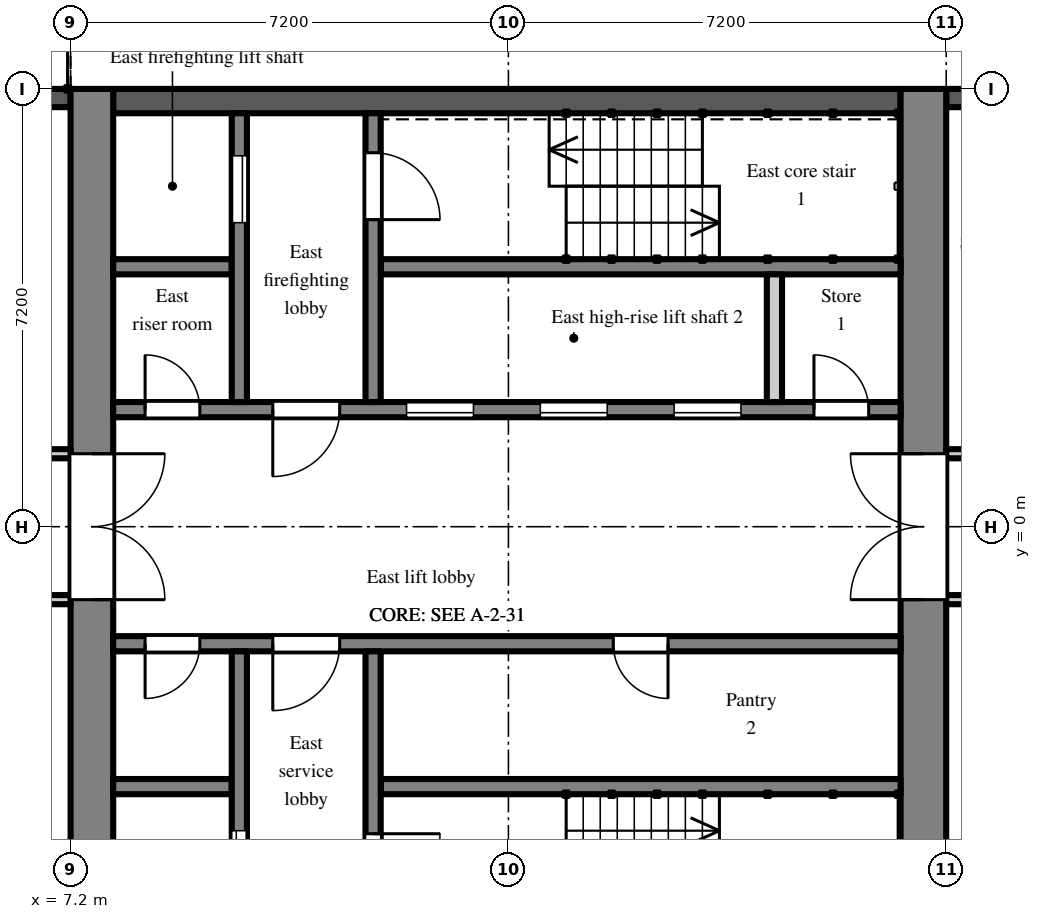
"""IFC4 building model, lengths in metres.
Left out: names, types, materials, properties, quantities, classifications, styles, units other than length and angle.
Written with IfcOpenShell. Run it as: python <this file> out.ifc"""

import sys

from ifc_helpers import new_model, si_unit, direction, frame, frame_2d, origin, place, context, subcontext, project, spatial, rectangle, extrude, element, fill, save


model = new_model("IFC4")
c1 = context("Model", 3, precision=1e-05, world=origin(), true_north=direction((0.0, 1.0)))
c2 = subcontext(c1, "Body", "Model", "MODEL_VIEW")
j1 = project(units=[si_unit("LENGTHUNIT", "METRE"), si_unit("PLANEANGLEUNIT", "RADIAN")], contexts=[c1])
p1 = place(None, origin())
s1 = spatial("IfcSite", under=j1, at=p1, CompositionType="ELEMENT")
p2 = place(p1, origin())
s2 = spatial("IfcBuilding", under=s1, at=p2, CompositionType="ELEMENT")
p3 = place(p2, frame((0.0, 0.0, 188.7)))
s3 = spatial("IfcBuildingStorey", under=s2, at=p3, CompositionType="ELEMENT", Elevation=188.7)
p4 = place(p3, frame((24.3, 7.05, 0.0), z_axis=(0.0, 0.0, 1.0), x_axis=(-1.0, 0.0, 0.0)))
e1 = element("IfcWall", 1, at=p4, inside=s3, PredefinedType="SOLIDWALL", context=c2, shape_type="SweptSolid", body=[
    extrude(rectangle(XDim=2.7, YDim=0.3, at=frame_2d((1.35, 0.0))), origin(), (0.0, 0.0, 1.0), 2.2),
])
p5 = place(p4, frame((0.75, 0.0, 0.2)))
e2 = element("IfcOpeningElement", 2, at=p5, cuts=e1, PredefinedType="OPENING", context=c2, shape_type="SweptSolid", body=[
    extrude(rectangle(XDim=1.2, YDim=1.85, at=frame_2d((0.6, 0.925))), frame((0.0, 0.16, 0.0), z_axis=(0.0, -1.0, 0.0), x_axis=(1.0, 0.0, 0.0)), (0.0, 0.0, 1.0), 0.32),
])
p6 = place(p3, frame((7.2, 7.05, 0.0), z_axis=(0.0, 0.0, 1.0), x_axis=(-1.0, 0.0, 0.0)))
e3 = element("IfcWall", 3, at=p6, inside=s3, PredefinedType="SOLIDWALL", context=c2, shape_type="SweptSolid", body=[
    extrude(rectangle(XDim=3.0, YDim=0.3, at=frame_2d((1.5, 0.0))), origin(), (0.0, 0.0, 1.0), 2.2),
])
p7 = place(p3, frame((7.55, -7.2, 0.0), z_axis=(0.0, 0.0, 1.0), x_axis=(0.0, 1.0, 0.0)))
e4 = element("IfcWall", 4, at=p7, inside=s3, PredefinedType="SHEAR", context=c2, shape_type="SweptSolid", body=[
    extrude(rectangle(XDim=14.4, YDim=0.7, at=frame_2d((7.2, 0.0))), origin(), (0.0, 0.0, 1.0), 2.6),
])
p8 = place(p7, frame((6.0, 0.0, 0.0)))
e5 = element("IfcOpeningElement", 5, at=p8, cuts=e4, PredefinedType="OPENING", context=c2, shape_type="SweptSolid", body=[
    extrude(rectangle(XDim=2.4, YDim=2.2, at=frame_2d((1.2, 1.1))), frame((0.0, 0.36, 0.0), z_axis=(0.0, -1.0, 0.0), x_axis=(1.0, 0.0, 0.0)), (0.0, 0.0, 1.0), 0.72),
])
p9 = place(p3, frame((21.225, -7.2, 0.0), z_axis=(0.0, 0.0, 1.0), x_axis=(0.0, 1.0, 0.0)))
e6 = element("IfcWall", 6, at=p9, inside=s3, PredefinedType="SHEAR", context=c2, shape_type="SweptSolid", body=[
    extrude(rectangle(XDim=14.4, YDim=0.75, at=frame_2d((7.2, 0.0))), origin(), (0.0, 0.0, 1.0), 2.6),
])
p10 = place(p9, frame((6.0, 0.0, 0.0)))
e7 = element("IfcOpeningElement", 7, at=p10, cuts=e6, PredefinedType="OPENING", context=c2, shape_type="SweptSolid", body=[
    extrude(rectangle(XDim=2.4, YDim=2.2, at=frame_2d((1.2, 1.1))), frame((0.0, 0.385, 0.0), z_axis=(0.0, -1.0, 0.0), x_axis=(1.0, 0.0, 0.0)), (0.0, 0.0, 1.0), 0.77),
])
p11 = place(p3, frame((7.9, 7.0, 0.0), z_axis=(0.0, 0.0, 1.0), x_axis=(1.0, 0.0, 0.0)))
e8 = element("IfcWall", 8, at=p11, inside=s3, PredefinedType="SHEAR", context=c2, shape_type="SweptSolid", body=[
    extrude(rectangle(XDim=12.95, YDim=0.4, at=frame_2d((6.475, 0.0))), origin(), (0.0, 0.0, 1.0), 2.6),
])
p12 = place(p3, frame((7.9, 1.925, 0.0), z_axis=(0.0, 0.0, 1.0), x_axis=(1.0, 0.0, 0.0)))
e9 = element("IfcWall", 9, at=p12, inside=s3, PredefinedType="SHEAR", context=c2, shape_type="SweptSolid", body=[
    extrude(rectangle(XDim=12.95, YDim=0.25, at=frame_2d((6.475, 0.0))), origin(), (0.0, 0.0, 1.0), 2.6),
])
p13 = place(p12, frame((4.825, 0.0, 0.0)))
e10 = element("IfcOpeningElement", 10, at=p13, cuts=e9, PredefinedType="OPENING", context=c2, shape_type="SweptSolid", body=[
    extrude(rectangle(XDim=1.1, YDim=2.1, at=frame_2d((0.55, 1.05))), frame((0.0, 0.135, 0.0), z_axis=(0.0, -1.0, 0.0), x_axis=(1.0, 0.0, 0.0)), (0.0, 0.0, 1.0), 0.27),
])
p14 = place(p12, frame((7.025, 0.0, 0.0)))
e11 = element("IfcOpeningElement", 11, at=p14, cuts=e9, PredefinedType="OPENING", context=c2, shape_type="SweptSolid", body=[
    extrude(rectangle(XDim=1.1, YDim=2.1, at=frame_2d((0.55, 1.05))), frame((0.0, 0.135, 0.0), z_axis=(0.0, -1.0, 0.0), x_axis=(1.0, 0.0, 0.0)), (0.0, 0.0, 1.0), 0.27),
])
p15 = place(p12, frame((9.225, 0.0, 0.0)))
e12 = element("IfcOpeningElement", 12, at=p15, cuts=e9, PredefinedType="OPENING", context=c2, shape_type="SweptSolid", body=[
    extrude(rectangle(XDim=1.1, YDim=2.1, at=frame_2d((0.55, 1.05))), frame((0.0, 0.135, 0.0), z_axis=(0.0, -1.0, 0.0), x_axis=(1.0, 0.0, 0.0)), (0.0, 0.0, 1.0), 0.27),
])
p16 = place(p12, frame((0.525, 0.0, 0.0)))
e13 = element("IfcOpeningElement", 13, at=p16, cuts=e9, PredefinedType="OPENING", context=c2, shape_type="SweptSolid", body=[
    extrude(rectangle(XDim=0.9, YDim=2.1, at=frame_2d((0.45, 1.05))), frame((0.0, 0.135, 0.0), z_axis=(0.0, -1.0, 0.0), x_axis=(1.0, 0.0, 0.0)), (0.0, 0.0, 1.0), 0.27),
])
p17 = place(p12, frame((2.625, 0.0, 0.0)))
e14 = element("IfcOpeningElement", 14, at=p17, cuts=e9, PredefinedType="OPENING", context=c2, shape_type="SweptSolid", body=[
    extrude(rectangle(XDim=1.1, YDim=2.1, at=frame_2d((0.55, 1.05))), frame((0.0, 0.135, 0.0), z_axis=(0.0, -1.0, 0.0), x_axis=(1.0, 0.0, 0.0)), (0.0, 0.0, 1.0), 0.27),
])
p18 = place(p12, frame((11.525, 0.0, 0.0)))
e15 = element("IfcOpeningElement", 15, at=p18, cuts=e9, PredefinedType="OPENING", context=c2, shape_type="SweptSolid", body=[
    extrude(rectangle(XDim=0.9, YDim=2.1, at=frame_2d((0.45, 1.05))), frame((0.0, 0.135, 0.0), z_axis=(0.0, -1.0, 0.0), x_axis=(1.0, 0.0, 0.0)), (0.0, 0.0, 1.0), 0.27),
])
p19 = place(p3, frame((7.9, 4.275, 0.0), z_axis=(0.0, 0.0, 1.0), x_axis=(1.0, 0.0, 0.0)))
e16 = element("IfcWall", 16, at=p19, inside=s3, PredefinedType="SHEAR", context=c2, shape_type="SweptSolid", body=[
    extrude(rectangle(XDim=1.95, YDim=0.25, at=frame_2d((0.975, 0.0))), origin(), (0.0, 0.0, 1.0), 2.6),
])
p20 = place(p3, frame((12.3, 4.275, 0.0), z_axis=(0.0, 0.0, 1.0), x_axis=(1.0, 0.0, 0.0)))
e17 = element("IfcWall", 17, at=p20, inside=s3, PredefinedType="SHEAR", context=c2, shape_type="SweptSolid", body=[
    extrude(rectangle(XDim=8.55, YDim=0.25, at=frame_2d((4.275, 0.0))), origin(), (0.0, 0.0, 1.0), 2.6),
])
p21 = place(p3, frame((9.975, 2.05, 0.0), z_axis=(0.0, 0.0, 1.0), x_axis=(0.0, 1.0, 0.0)))
e18 = element("IfcWall", 18, at=p21, inside=s3, PredefinedType="SHEAR", context=c2, shape_type="SweptSolid", body=[
    extrude(rectangle(XDim=4.75, YDim=0.25, at=frame_2d((2.375, 0.0))), origin(), (0.0, 0.0, 1.0), 2.6),
])
p22 = place(p21, frame((2.95, 0.0, 0.0)))
e19 = element("IfcOpeningElement", 19, at=p22, cuts=e18, PredefinedType="OPENING", context=c2, shape_type="SweptSolid", body=[
    extrude(rectangle(XDim=1.1, YDim=2.1, at=frame_2d((0.55, 1.05))), frame((0.0, 0.135, 0.0), z_axis=(0.0, -1.0, 0.0), x_axis=(1.0, 0.0, 0.0)), (0.0, 0.0, 1.0), 0.27),
])
p23 = place(p3, frame((12.175, 2.05, 0.0), z_axis=(0.0, 0.0, 1.0), x_axis=(0.0, 1.0, 0.0)))
e20 = element("IfcWall", 20, at=p23, inside=s3, PredefinedType="SHEAR", context=c2, shape_type="SweptSolid", body=[
    extrude(rectangle(XDim=4.75, YDim=0.25, at=frame_2d((2.375, 0.0))), origin(), (0.0, 0.0, 1.0), 2.6),
])
p24 = place(p23, frame((3.0, 0.0, 0.0)))
e21 = element("IfcOpeningElement", 21, at=p24, cuts=e20, PredefinedType="OPENING", context=c2, shape_type="SweptSolid", body=[
    extrude(rectangle(XDim=1.1, YDim=2.1, at=frame_2d((0.55, 1.05))), frame((0.0, 0.135, 0.0), z_axis=(0.0, -1.0, 0.0), x_axis=(1.0, 0.0, 0.0)), (0.0, 0.0, 1.0), 0.27),
])
p25 = place(p3, frame((18.775, 2.05, 0.0), z_axis=(0.0, 0.0, 1.0), x_axis=(0.0, 1.0, 0.0)))
e22 = element("IfcWall", 22, at=p25, inside=s3, PredefinedType="PARTITIONING", context=c2, shape_type="SweptSolid", body=[
    extrude(rectangle(XDim=2.1, YDim=0.25, at=frame_2d((1.05, 0.0))), origin(), (0.0, 0.0, 1.0), 2.6),
])
p26 = place(p3, frame((7.9, -1.925, 0.0), z_axis=(0.0, 0.0, 1.0), x_axis=(1.0, 0.0, 0.0)))
e23 = element("IfcWall", 23, at=p26, inside=s3, PredefinedType="SHEAR", context=c2, shape_type="SweptSolid", body=[
    extrude(rectangle(XDim=12.95, YDim=0.25, at=frame_2d((6.475, 0.0))), origin(), (0.0, 0.0, 1.0), 2.6),
])
p27 = place(p26, frame((0.525, 0.0, 0.0)))
e24 = element("IfcOpeningElement", 24, at=p27, cuts=e23, PredefinedType="OPENING", context=c2, shape_type="SweptSolid", body=[
    extrude(rectangle(XDim=0.9, YDim=2.1, at=frame_2d((0.45, 1.05))), frame((0.0, 0.135, 0.0), z_axis=(0.0, -1.0, 0.0), x_axis=(1.0, 0.0, 0.0)), (0.0, 0.0, 1.0), 0.27),
])
p28 = place(p26, frame((2.625, 0.0, 0.0)))
e25 = element("IfcOpeningElement", 25, at=p28, cuts=e23, PredefinedType="OPENING", context=c2, shape_type="SweptSolid", body=[
    extrude(rectangle(XDim=1.1, YDim=2.1, at=frame_2d((0.55, 1.05))), frame((0.0, 0.135, 0.0), z_axis=(0.0, -1.0, 0.0), x_axis=(1.0, 0.0, 0.0)), (0.0, 0.0, 1.0), 0.27),
])
p29 = place(p26, frame((8.225, 0.0, 0.0)))
e26 = element("IfcOpeningElement", 26, at=p29, cuts=e23, PredefinedType="OPENING", context=c2, shape_type="SweptSolid", body=[
    extrude(rectangle(XDim=0.9, YDim=2.1, at=frame_2d((0.45, 1.05))), frame((0.0, 0.135, 0.0), z_axis=(0.0, -1.0, 0.0), x_axis=(1.0, 0.0, 0.0)), (0.0, 0.0, 1.0), 0.27),
])
p30 = place(p3, frame((7.9, -4.275, 0.0), z_axis=(0.0, 0.0, 1.0), x_axis=(1.0, 0.0, 0.0)))
e27 = element("IfcWall", 27, at=p30, inside=s3, PredefinedType="SHEAR", context=c2, shape_type="SweptSolid", body=[
    extrude(rectangle(XDim=1.95, YDim=0.25, at=frame_2d((0.975, 0.0))), origin(), (0.0, 0.0, 1.0), 2.6),
])
p31 = place(p3, frame((12.3, -4.275, 0.0), z_axis=(0.0, 0.0, 1.0), x_axis=(1.0, 0.0, 0.0)))
e28 = element("IfcWall", 28, at=p31, inside=s3, PredefinedType="SHEAR", context=c2, shape_type="SweptSolid", body=[
    extrude(rectangle(XDim=8.55, YDim=0.25, at=frame_2d((4.275, 0.0))), origin(), (0.0, 0.0, 1.0), 2.6),
])
p32 = place(p3, frame((9.975, -2.05, 0.0), z_axis=(0.0, 0.0, 1.0), x_axis=(0.0, -1.0, 0.0)))
e29 = element("IfcWall", 29, at=p32, inside=s3, PredefinedType="SHEAR", context=c2, shape_type="SweptSolid", body=[
    extrude(rectangle(XDim=4.75, YDim=0.25, at=frame_2d((2.375, 0.0))), origin(), (0.0, 0.0, 1.0), 2.6),
])
p33 = place(p32, frame((2.95, 0.0, 0.0)))
e30 = element("IfcOpeningElement", 30, at=p33, cuts=e29, PredefinedType="OPENING", context=c2, shape_type="SweptSolid", body=[
    extrude(rectangle(XDim=1.1, YDim=2.1, at=frame_2d((0.55, 1.05))), frame((0.0, 0.135, 0.0), z_axis=(0.0, -1.0, 0.0), x_axis=(1.0, 0.0, 0.0)), (0.0, 0.0, 1.0), 0.27),
])
p34 = place(p3, frame((12.175, -2.05, 0.0), z_axis=(0.0, 0.0, 1.0), x_axis=(0.0, -1.0, 0.0)))
e31 = element("IfcWall", 31, at=p34, inside=s3, PredefinedType="SHEAR", context=c2, shape_type="SweptSolid", body=[
    extrude(rectangle(XDim=4.75, YDim=0.25, at=frame_2d((2.375, 0.0))), origin(), (0.0, 0.0, 1.0), 2.6),
])
p35 = place(p34, frame((3.0, 0.0, 0.0)))
e32 = element("IfcOpeningElement", 32, at=p35, cuts=e31, PredefinedType="OPENING", context=c2, shape_type="SweptSolid", body=[
    extrude(rectangle(XDim=1.1, YDim=2.1, at=frame_2d((0.55, 1.05))), frame((0.0, 0.135, 0.0), z_axis=(0.0, -1.0, 0.0), x_axis=(1.0, 0.0, 0.0)), (0.0, 0.0, 1.0), 0.27),
])
p36 = place(p3, frame((1.275, -1.2, 0.0), z_axis=(0.0, 0.0, 1.0), x_axis=(1.0, 0.0, 0.0)))
e33 = element("IfcWall", 33, at=p36, inside=s3, PredefinedType="PARTITIONING", context=c2, shape_type="SweptSolid", body=[
    extrude(rectangle(XDim=5.925, YDim=0.15, at=frame_2d((2.962, 0.0))), origin(), (0.0, 0.0, 1.0), 2.6),
])
p37 = place(p36, frame((2.475, 0.0, 0.0)))
e34 = element("IfcOpeningElement", 34, at=p37, cuts=e33, PredefinedType="OPENING", context=c2, shape_type="SweptSolid", body=[
    extrude(rectangle(XDim=0.9, YDim=2.1, at=frame_2d((0.45, 1.05))), frame((0.0, 0.085, 0.0), z_axis=(0.0, -1.0, 0.0), x_axis=(1.0, 0.0, 0.0)), (0.0, 0.0, 1.0), 0.17),
])
p38 = place(p36, frame((4.475, 0.0, 0.0)))
e35 = element("IfcOpeningElement", 35, at=p38, cuts=e33, PredefinedType="OPENING", context=c2, shape_type="SweptSolid", body=[
    extrude(rectangle(XDim=0.9, YDim=2.1, at=frame_2d((0.45, 1.05))), frame((0.0, 0.085, 0.0), z_axis=(0.0, -1.0, 0.0), x_axis=(1.0, 0.0, 0.0)), (0.0, 0.0, 1.0), 0.17),
])
p39 = place(p3, frame((1.275, 1.2, 0.0), z_axis=(0.0, 0.0, 1.0), x_axis=(1.0, 0.0, 0.0)))
e36 = element("IfcWall", 36, at=p39, inside=s3, PredefinedType="PARTITIONING", context=c2, shape_type="SweptSolid", body=[
    extrude(rectangle(XDim=5.925, YDim=0.15, at=frame_2d((2.962, 0.0))), origin(), (0.0, 0.0, 1.0), 2.6),
])
p40 = place(p39, frame((0.675, 0.0, 0.0)))
e37 = element("IfcOpeningElement", 37, at=p40, cuts=e36, PredefinedType="OPENING", context=c2, shape_type="SweptSolid", body=[
    extrude(rectangle(XDim=0.9, YDim=2.1, at=frame_2d((0.45, 1.05))), frame((0.0, 0.085, 0.0), z_axis=(0.0, -1.0, 0.0), x_axis=(1.0, 0.0, 0.0)), (0.0, 0.0, 1.0), 0.17),
])
p41 = place(p39, frame((3.075, 0.0, 0.0)))
e38 = element("IfcOpeningElement", 38, at=p41, cuts=e36, PredefinedType="OPENING", context=c2, shape_type="SweptSolid", body=[
    extrude(rectangle(XDim=0.9, YDim=2.1, at=frame_2d((0.45, 1.05))), frame((0.0, 0.085, 0.0), z_axis=(0.0, -1.0, 0.0), x_axis=(1.0, 0.0, 0.0)), (0.0, 0.0, 1.0), 0.17),
])
p42 = place(p3, frame((21.6, -1.2, 0.0), z_axis=(0.0, 0.0, 1.0), x_axis=(1.0, 0.0, 0.0)))
e39 = element("IfcWall", 39, at=p42, inside=s3, PredefinedType="PARTITIONING", context=c2, shape_type="SweptSolid", body=[
    extrude(rectangle(XDim=5.125, YDim=0.15, at=frame_2d((2.562, 0.0))), origin(), (0.0, 0.0, 1.0), 2.6),
])
p43 = place(p42, frame((1.7, 0.0, 0.0)))
e40 = element("IfcOpeningElement", 40, at=p43, cuts=e39, PredefinedType="OPENING", context=c2, shape_type="SweptSolid", body=[
    extrude(rectangle(XDim=1.8, YDim=2.1, at=frame_2d((0.9, 1.05))), frame((0.0, 0.085, 0.0), z_axis=(0.0, -1.0, 0.0), x_axis=(1.0, 0.0, 0.0)), (0.0, 0.0, 1.0), 0.17),
])
p44 = place(p3, frame((21.6, 1.2, 0.0), z_axis=(0.0, 0.0, 1.0), x_axis=(1.0, 0.0, 0.0)))
e41 = element("IfcWall", 41, at=p44, inside=s3, PredefinedType="PARTITIONING", context=c2, shape_type="SweptSolid", body=[
    extrude(rectangle(XDim=5.125, YDim=0.15, at=frame_2d((2.562, 0.0))), origin(), (0.0, 0.0, 1.0), 2.6),
])
p45 = place(p44, frame((0.6, 0.0, 0.0)))
e42 = element("IfcOpeningElement", 42, at=p45, cuts=e41, PredefinedType="OPENING", context=c2, shape_type="SweptSolid", body=[
    extrude(rectangle(XDim=1.0, YDim=2.1, at=frame_2d((0.5, 1.05))), frame((0.0, 0.085, 0.0), z_axis=(0.0, -1.0, 0.0), x_axis=(1.0, 0.0, 0.0)), (0.0, 0.0, 1.0), 0.17),
])
p46 = place(p13, origin())
e43 = element("IfcDoor", 43, at=p46, inside=s3, OperationType="SLIDING_TO_LEFT", PredefinedType="DOOR", context=c2, shape_type="SweptSolid", body=[
    extrude(rectangle(XDim=1.1, YDim=2.1, at=frame_2d((0.55, 1.05))), frame((0.0, 0.025, 0.0), z_axis=(0.0, -1.0, 0.0), x_axis=(1.0, 0.0, 0.0)), (0.0, 0.0, 1.0), 0.05),
])
fill(e10, e43)
p47 = place(p14, origin())
e44 = element("IfcDoor", 44, at=p47, inside=s3, OperationType="SLIDING_TO_LEFT", PredefinedType="DOOR", context=c2, shape_type="SweptSolid", body=[
    extrude(rectangle(XDim=1.1, YDim=2.1, at=frame_2d((0.55, 1.05))), frame((0.0, 0.025, 0.0), z_axis=(0.0, -1.0, 0.0), x_axis=(1.0, 0.0, 0.0)), (0.0, 0.0, 1.0), 0.05),
])
fill(e11, e44)
p48 = place(p15, origin())
e45 = element("IfcDoor", 45, at=p48, inside=s3, OperationType="SLIDING_TO_LEFT", PredefinedType="DOOR", context=c2, shape_type="SweptSolid", body=[
    extrude(rectangle(XDim=1.1, YDim=2.1, at=frame_2d((0.55, 1.05))), frame((0.0, 0.025, 0.0), z_axis=(0.0, -1.0, 0.0), x_axis=(1.0, 0.0, 0.0)), (0.0, 0.0, 1.0), 0.05),
])
fill(e12, e45)
p49 = place(p22, origin())
e46 = element("IfcDoor", 46, at=p49, inside=s3, OperationType="SLIDING_TO_LEFT", PredefinedType="DOOR", context=c2, shape_type="SweptSolid", body=[
    extrude(rectangle(XDim=1.1, YDim=2.1, at=frame_2d((0.55, 1.05))), frame((0.0, 0.025, 0.0), z_axis=(0.0, -1.0, 0.0), x_axis=(1.0, 0.0, 0.0)), (0.0, 0.0, 1.0), 0.05),
])
fill(e19, e46)
p50 = place(p33, origin())
e47 = element("IfcDoor", 47, at=p50, inside=s3, OperationType="SLIDING_TO_LEFT", PredefinedType="DOOR", context=c2, shape_type="SweptSolid", body=[
    extrude(rectangle(XDim=1.1, YDim=2.1, at=frame_2d((0.55, 1.05))), frame((0.0, 0.025, 0.0), z_axis=(0.0, -1.0, 0.0), x_axis=(1.0, 0.0, 0.0)), (0.0, 0.0, 1.0), 0.05),
])
fill(e30, e47)
p51 = place(p24, frame((1.1, 0.0, 0.0), z_axis=(0.0, 0.0, 1.0), x_axis=(-1.0, 0.0, 0.0)))
e48 = element("IfcDoor", 48, at=p51, inside=s3, OperationType="SINGLE_SWING_RIGHT", PredefinedType="DOOR", context=c2, shape_type="SweptSolid", body=[
    extrude(rectangle(XDim=1.1, YDim=2.1, at=frame_2d((0.55, 1.05))), frame((0.0, 0.025, 0.0), z_axis=(0.0, -1.0, 0.0), x_axis=(1.0, 0.0, 0.0)), (0.0, 0.0, 1.0), 0.05),
])
fill(e21, e48)
p52 = place(p35, origin())
e49 = element("IfcDoor", 49, at=p52, inside=s3, OperationType="SINGLE_SWING_LEFT", PredefinedType="DOOR", context=c2, shape_type="SweptSolid", body=[
    extrude(rectangle(XDim=1.1, YDim=2.1, at=frame_2d((0.55, 1.05))), frame((0.0, 0.025, 0.0), z_axis=(0.0, -1.0, 0.0), x_axis=(1.0, 0.0, 0.0)), (0.0, 0.0, 1.0), 0.05),
])
fill(e32, e49)
p53 = place(p16, origin())
e50 = element("IfcDoor", 50, at=p53, inside=s3, OperationType="SINGLE_SWING_LEFT", PredefinedType="DOOR", context=c2, shape_type="SweptSolid", body=[
    extrude(rectangle(XDim=0.9, YDim=2.1, at=frame_2d((0.45, 1.05))), frame((0.0, 0.025, 0.0), z_axis=(0.0, -1.0, 0.0), x_axis=(1.0, 0.0, 0.0)), (0.0, 0.0, 1.0), 0.05),
])
fill(e13, e50)
p54 = place(p27, frame((0.9, 0.0, 0.0), z_axis=(0.0, 0.0, 1.0), x_axis=(-1.0, 0.0, 0.0)))
e51 = element("IfcDoor", 51, at=p54, inside=s3, OperationType="SINGLE_SWING_RIGHT", PredefinedType="DOOR", context=c2, shape_type="SweptSolid", body=[
    extrude(rectangle(XDim=0.9, YDim=2.1, at=frame_2d((0.45, 1.05))), frame((0.0, 0.025, 0.0), z_axis=(0.0, -1.0, 0.0), x_axis=(1.0, 0.0, 0.0)), (0.0, 0.0, 1.0), 0.05),
])
fill(e24, e51)
p55 = place(p17, frame((1.1, 0.0, 0.0), z_axis=(0.0, 0.0, 1.0), x_axis=(-1.0, 0.0, 0.0)))
e52 = element("IfcDoor", 52, at=p55, inside=s3, OperationType="SINGLE_SWING_RIGHT", PredefinedType="DOOR", context=c2, shape_type="SweptSolid", body=[
    extrude(rectangle(XDim=1.1, YDim=2.1, at=frame_2d((0.55, 1.05))), frame((0.0, 0.025, 0.0), z_axis=(0.0, -1.0, 0.0), x_axis=(1.0, 0.0, 0.0)), (0.0, 0.0, 1.0), 0.05),
])
fill(e14, e52)
p56 = place(p28, frame((1.1, 0.0, 0.0), z_axis=(0.0, 0.0, 1.0), x_axis=(-1.0, 0.0, 0.0)))
e53 = element("IfcDoor", 53, at=p56, inside=s3, OperationType="SINGLE_SWING_RIGHT", PredefinedType="DOOR", context=c2, shape_type="SweptSolid", body=[
    extrude(rectangle(XDim=1.1, YDim=2.1, at=frame_2d((0.55, 1.05))), frame((0.0, 0.025, 0.0), z_axis=(0.0, -1.0, 0.0), x_axis=(1.0, 0.0, 0.0)), (0.0, 0.0, 1.0), 0.05),
])
fill(e25, e53)
p57 = place(p8, frame((2.4, 0.0, 0.0), z_axis=(0.0, 0.0, 1.0), x_axis=(-1.0, 0.0, 0.0)))
e54 = element("IfcDoor", 54, at=p57, inside=s3, OperationType="DOUBLE_DOOR_DOUBLE_SWING", PredefinedType="DOOR", context=c2, shape_type="SweptSolid", body=[
    extrude(rectangle(XDim=2.4, YDim=2.2, at=frame_2d((1.2, 1.1))), frame((0.0, 0.025, 0.0), z_axis=(0.0, -1.0, 0.0), x_axis=(1.0, 0.0, 0.0)), (0.0, 0.0, 1.0), 0.05),
])
fill(e5, e54)
p58 = place(p10, origin())
e55 = element("IfcDoor", 55, at=p58, inside=s3, OperationType="DOUBLE_DOOR_DOUBLE_SWING", PredefinedType="DOOR", context=c2, shape_type="SweptSolid", body=[
    extrude(rectangle(XDim=2.4, YDim=2.2, at=frame_2d((1.2, 1.1))), frame((0.0, 0.025, 0.0), z_axis=(0.0, -1.0, 0.0), x_axis=(1.0, 0.0, 0.0)), (0.0, 0.0, 1.0), 0.05),
])
fill(e7, e55)
p59 = place(p18, origin())
e56 = element("IfcDoor", 56, at=p59, inside=s3, OperationType="SINGLE_SWING_LEFT", PredefinedType="DOOR", context=c2, shape_type="SweptSolid", body=[
    extrude(rectangle(XDim=0.9, YDim=2.1, at=frame_2d((0.45, 1.05))), frame((0.0, 0.025, 0.0), z_axis=(0.0, -1.0, 0.0), x_axis=(1.0, 0.0, 0.0)), (0.0, 0.0, 1.0), 0.05),
])
fill(e15, e56)
p60 = place(p29, frame((0.9, 0.0, 0.0), z_axis=(0.0, 0.0, 1.0), x_axis=(-1.0, 0.0, 0.0)))
e57 = element("IfcDoor", 57, at=p60, inside=s3, OperationType="SINGLE_SWING_LEFT", PredefinedType="DOOR", context=c2, shape_type="SweptSolid", body=[
    extrude(rectangle(XDim=0.9, YDim=2.1, at=frame_2d((0.45, 1.05))), frame((0.0, 0.025, 0.0), z_axis=(0.0, -1.0, 0.0), x_axis=(1.0, 0.0, 0.0)), (0.0, 0.0, 1.0), 0.05),
])
fill(e26, e57)
save(model, sys.argv[1])
